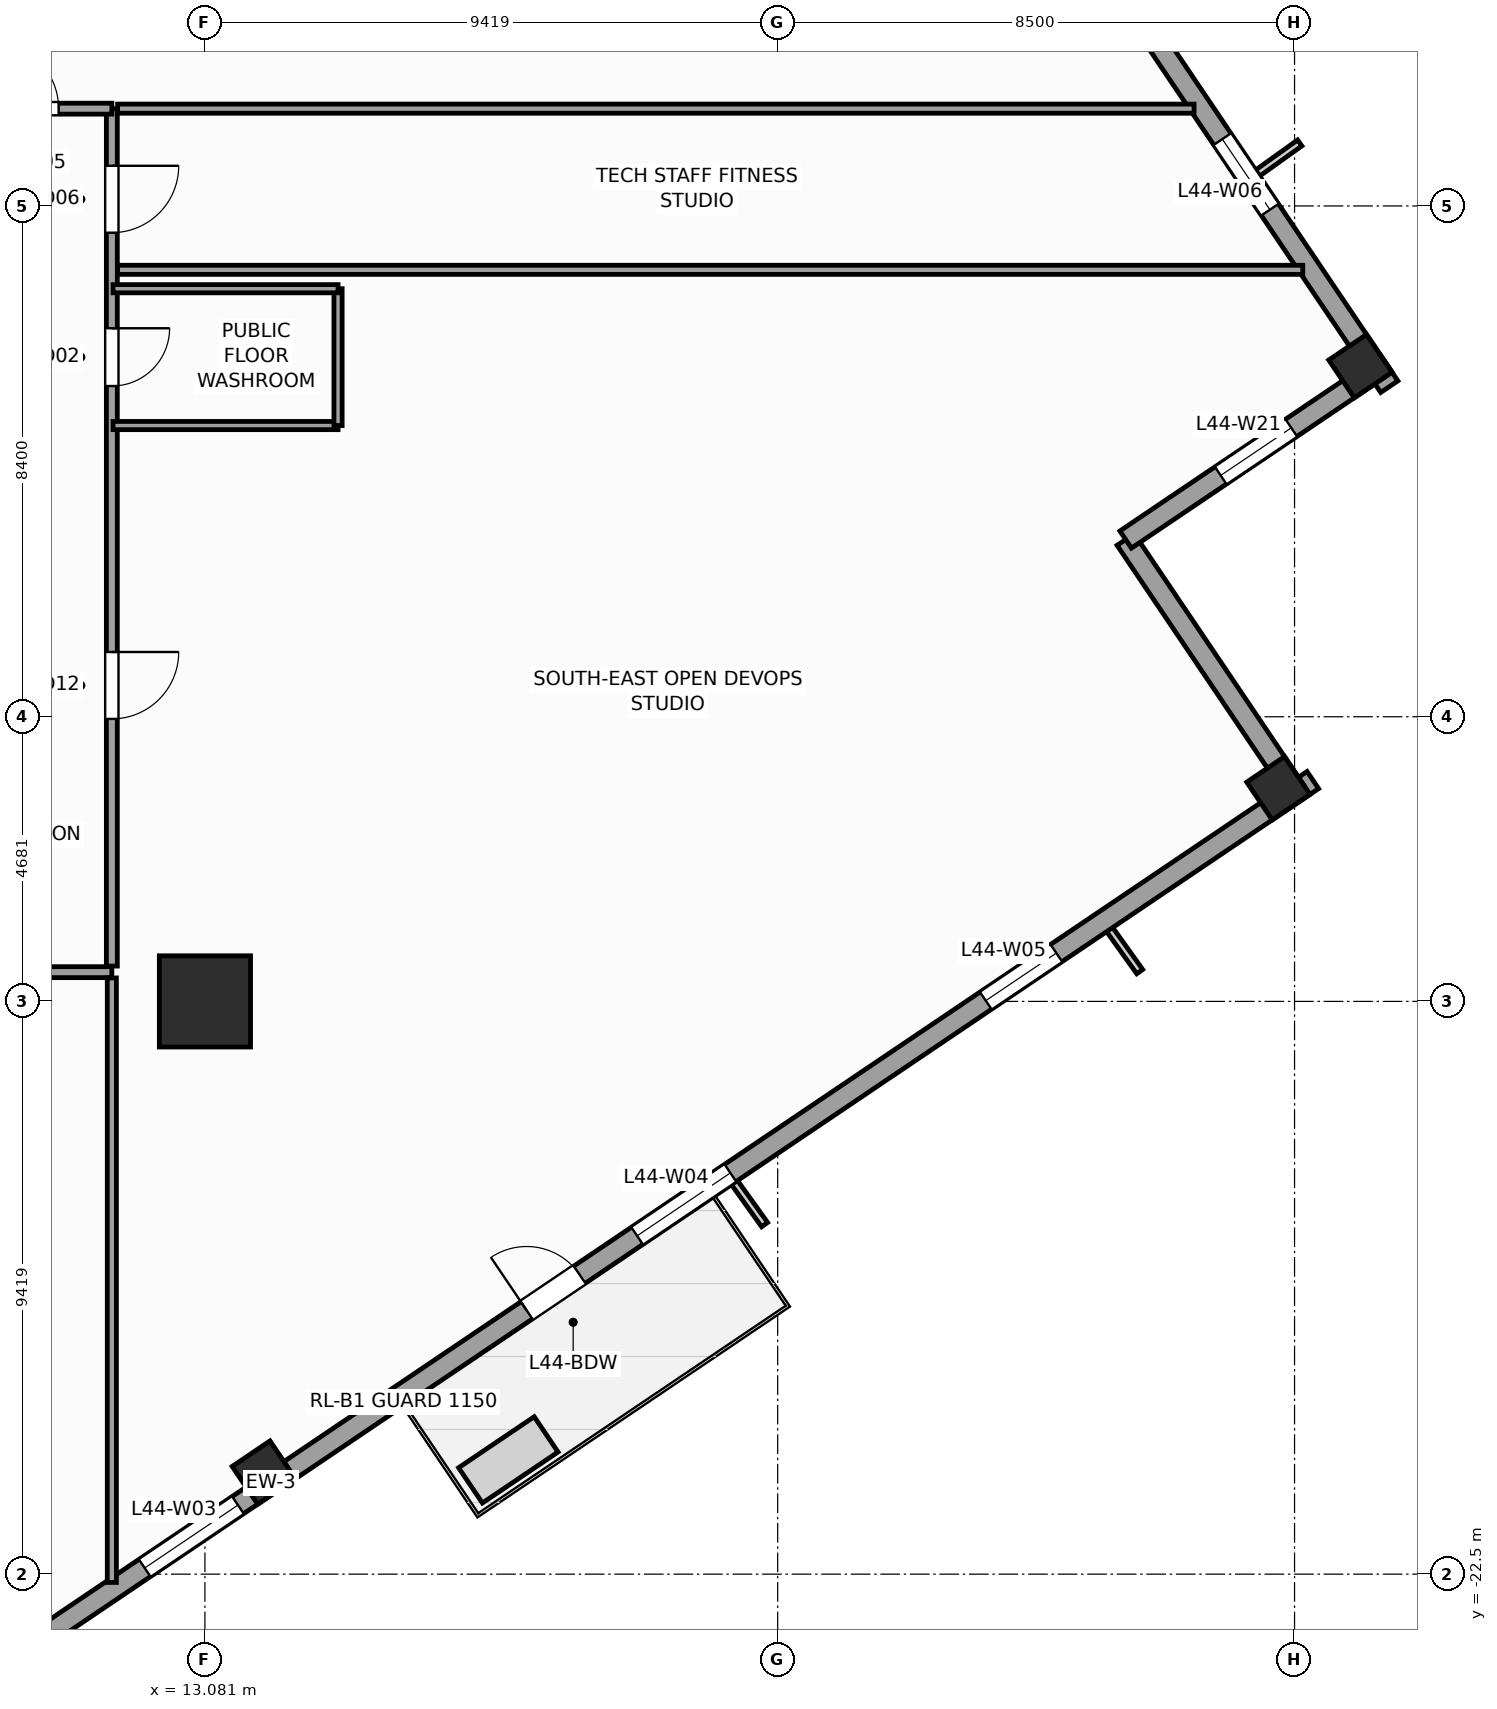
"""IFC4 building model, lengths in metres.
Left out: names, types, materials, properties, quantities, classifications, styles, units other than length and angle.
Written with IfcOpenShell. Run it as: python <this file> out.ifc"""

import sys

from ifc_helpers import new_model, si_unit, direction, frame, frame_2d, origin, origin_2d, place, context, subcontext, project, spatial, rectangle, extrude, source, transform, mapped, element, fill, save


model = new_model("IFC4")
c1 = context("Model", 3, precision=1e-05, world=origin(), true_north=direction((0.0, 1.0)))
c2 = subcontext(c1, "Body", "Model", "MODEL_VIEW")
j1 = project(units=[si_unit("LENGTHUNIT", "METRE"), si_unit("PLANEANGLEUNIT", "RADIAN")], contexts=[c1])
p1 = place(None, origin())
s1 = spatial("IfcSite", under=j1, at=p1, CompositionType="ELEMENT")
p2 = place(p1, origin())
s2 = spatial("IfcBuilding", under=s1, at=p2, CompositionType="ELEMENT")
p3 = place(p2, frame((0.0, 0.0, 184.4)))
s3 = spatial("IfcBuildingStorey", under=s2, at=p3, CompositionType="ELEMENT", Elevation=184.4)
m1 = source(origin(), c2, "Body", "SweptSolid", [
    extrude(rectangle(XDim=1.5, YDim=1.5, at=origin_2d()), origin(), (0.0, 0.0, 1.0), 4.0),
])
p4 = place(p3, frame((13.081, -13.081, 0.0), z_axis=(0.0, 0.0, 1.0), x_axis=(1.0, 0.0, 0.0)))
e1 = element("IfcColumn", 1, at=p4, inside=s3, PredefinedType="COLUMN", context=c2, shape_type="MappedRepresentation", body=[
    mapped(m1, transform((0.0, 0.0, 0.0), scale=1.0)),
])
m2 = source(origin(), c2, "Body", "SweptSolid", [
    extrude(rectangle(XDim=0.75, YDim=0.75, at=origin_2d()), origin(), (0.0, 0.0, 1.0), 4.0),
])
for number, where, z_axis, x_axis in (
    (2, (14.05, -20.83, 0.0), (0.0, 0.0, 1.0), (0.829, 0.559, 0.0)),
    (3, (30.734, -9.576, 0.0), (0.0, 0.0, 1.0), (0.829, 0.559, 0.0)),
    (4, (32.083, -2.635, 0.0), (0.0, 0.0, 1.0), (0.829, 0.559, 0.0)),
):
    element("IfcColumn", number, at=place(p3, frame(where, z_axis=z_axis, x_axis=x_axis)), inside=s3, PredefinedType="COLUMN", context=c2, shape_type="MappedRepresentation", body=[
        mapped(m2, transform((0.0, 0.0, 0.0), scale=1.0)),
    ])
p5 = place(p3, frame((-2.972, -32.558, 0.0), z_axis=(0.0, 0.0, 1.0), x_axis=(0.829036218961, 0.559194910251, 0.0)))
e5 = element("IfcWall", 5, at=p5, inside=s3, PredefinedType="STANDARD", context=c2, shape_type="SweptSolid", body=[
    extrude(rectangle(XDim=41.34, YDim=0.34, at=frame_2d((20.67, 0.0))), origin(), (0.0, 0.0, 1.0), 3.04),
])
p6 = place(p5, frame((25.745, 0.0, 0.0)))
e6 = element("IfcOpeningElement", 6, at=p6, cuts=e5, PredefinedType="OPENING", context=c2, shape_type="SweptSolid", body=[
    extrude(rectangle(XDim=1.05, YDim=2.25, at=frame_2d((0.525, 1.125))), frame((0.0, 0.18, 0.0), z_axis=(0.0, -1.0, 0.0), x_axis=(1.0, 0.0, 0.0)), (0.0, 0.0, 1.0), 0.36),
])
p7 = place(p5, frame((4.261, 0.0, 0.56)))
e7 = element("IfcOpeningElement", 7, at=p7, cuts=e5, PredefinedType="OPENING", context=c2, shape_type="SweptSolid", body=[
    extrude(rectangle(XDim=1.4, YDim=2.4, at=frame_2d((0.7, 1.2))), frame((0.0, 0.18, 0.0), z_axis=(0.0, -1.0, 0.0), x_axis=(1.0, 0.0, 0.0)), (0.0, 0.0, 1.0), 0.36),
])
p8 = place(p5, frame((11.064, 0.0, 0.61)))
e8 = element("IfcOpeningElement", 8, at=p8, cuts=e5, PredefinedType="OPENING", context=c2, shape_type="SweptSolid", body=[
    extrude(rectangle(XDim=1.85, YDim=2.35, at=frame_2d((0.925, 1.175))), frame((0.0, 0.18, 0.0), z_axis=(0.0, -1.0, 0.0), x_axis=(1.0, 0.0, 0.0)), (0.0, 0.0, 1.0), 0.36),
])
p9 = place(p5, frame((18.168, 0.0, 0.61)))
e9 = element("IfcOpeningElement", 9, at=p9, cuts=e5, PredefinedType="OPENING", context=c2, shape_type="SweptSolid", body=[
    extrude(rectangle(XDim=1.85, YDim=2.35, at=frame_2d((0.925, 1.175))), frame((0.0, 0.18, 0.0), z_axis=(0.0, -1.0, 0.0), x_axis=(1.0, 0.0, 0.0)), (0.0, 0.0, 1.0), 0.36),
])
p10 = place(p5, frame((27.936, 0.0, 0.61)))
e10 = element("IfcOpeningElement", 10, at=p10, cuts=e5, PredefinedType="OPENING", context=c2, shape_type="SweptSolid", body=[
    extrude(rectangle(XDim=1.85, YDim=2.35, at=frame_2d((0.925, 1.175))), frame((0.0, 0.18, 0.0), z_axis=(0.0, -1.0, 0.0), x_axis=(1.0, 0.0, 0.0)), (0.0, 0.0, 1.0), 0.36),
])
p11 = place(p5, frame((34.852, 0.0, 0.56)))
e11 = element("IfcOpeningElement", 11, at=p11, cuts=e5, PredefinedType="OPENING", context=c2, shape_type="SweptSolid", body=[
    extrude(rectangle(XDim=1.4, YDim=2.4, at=frame_2d((0.7, 1.2))), frame((0.0, 0.18, 0.0), z_axis=(0.0, -1.0, 0.0), x_axis=(1.0, 0.0, 0.0)), (0.0, 0.0, 1.0), 0.36),
])
p12 = place(p3, frame((31.019, -9.631, 0.0), z_axis=(0.0, 0.0, 1.0), x_axis=(-0.559210350234, 0.829025804298, 0.0)))
e12 = element("IfcWall", 12, at=p12, inside=s3, PredefinedType="STANDARD", context=c2, shape_type="SweptSolid", body=[
    extrude(rectangle(XDim=5.0, YDim=0.34, at=frame_2d((2.5, 0.0))), origin(), (0.0, 0.0, 1.0), 3.74),
])
p13 = place(p3, frame((28.223, -5.486, 0.0), z_axis=(0.0, 0.0, 1.0), x_axis=(0.82905227345, 0.559171107879, 0.0)))
e13 = element("IfcWall", 13, at=p13, inside=s3, PredefinedType="STANDARD", context=c2, shape_type="SweptSolid", body=[
    extrude(rectangle(XDim=5.17, YDim=0.34, at=frame_2d((2.585, 0.0))), origin(), (0.0, 0.0, 1.0), 3.04),
])
p14 = place(p13, frame((1.885, 0.0, 0.56)))
e14 = element("IfcOpeningElement", 14, at=p14, cuts=e13, PredefinedType="OPENING", context=c2, shape_type="SweptSolid", body=[
    extrude(rectangle(XDim=1.4, YDim=2.4, at=frame_2d((0.7, 1.2))), frame((0.0, 0.18, 0.0), z_axis=(0.0, -1.0, 0.0), x_axis=(1.0, 0.0, 0.0)), (0.0, 0.0, 1.0), 0.36),
])
p15 = place(p3, frame((32.558, -2.972, 0.0), z_axis=(0.0, 0.0, 1.0), x_axis=(-0.559194910251, 0.829036218961, 0.0)))
e15 = element("IfcWall", 15, at=p15, inside=s3, PredefinedType="STANDARD", context=c2, shape_type="SweptSolid", body=[
    extrude(rectangle(XDim=41.34, YDim=0.34, at=frame_2d((20.67, 0.0))), origin(), (0.0, 0.0, 1.0), 3.04),
])
p16 = place(p15, frame((3.511, 0.0, 0.56)))
e16 = element("IfcOpeningElement", 16, at=p16, cuts=e15, PredefinedType="OPENING", context=c2, shape_type="SweptSolid", body=[
    extrude(rectangle(XDim=1.4, YDim=2.4, at=frame_2d((0.7, 1.2))), frame((0.0, 0.18, 0.0), z_axis=(0.0, -1.0, 0.0), x_axis=(1.0, 0.0, 0.0)), (0.0, 0.0, 1.0), 0.36),
])
p17 = place(p15, frame((11.064, 0.0, 0.61)))
e17 = element("IfcOpeningElement", 17, at=p17, cuts=e15, PredefinedType="OPENING", context=c2, shape_type="SweptSolid", body=[
    extrude(rectangle(XDim=1.85, YDim=2.35, at=frame_2d((0.925, 1.175))), frame((0.0, 0.18, 0.0), z_axis=(0.0, -1.0, 0.0), x_axis=(1.0, 0.0, 0.0)), (0.0, 0.0, 1.0), 0.36),
])
p18 = place(p15, frame((18.168, 0.0, 0.61)))
e18 = element("IfcOpeningElement", 18, at=p18, cuts=e15, PredefinedType="OPENING", context=c2, shape_type="SweptSolid", body=[
    extrude(rectangle(XDim=1.85, YDim=2.35, at=frame_2d((0.925, 1.175))), frame((0.0, 0.18, 0.0), z_axis=(0.0, -1.0, 0.0), x_axis=(1.0, 0.0, 0.0)), (0.0, 0.0, 1.0), 0.36),
])
p19 = place(p15, frame((27.186, 0.0, 0.61)))
e19 = element("IfcOpeningElement", 19, at=p19, cuts=e15, PredefinedType="OPENING", context=c2, shape_type="SweptSolid", body=[
    extrude(rectangle(XDim=1.85, YDim=2.35, at=frame_2d((0.925, 1.175))), frame((0.0, 0.18, 0.0), z_axis=(0.0, -1.0, 0.0), x_axis=(1.0, 0.0, 0.0)), (0.0, 0.0, 1.0), 0.36),
])
p20 = place(p15, frame((34.852, 0.0, 0.56)))
e20 = element("IfcOpeningElement", 20, at=p20, cuts=e15, PredefinedType="OPENING", context=c2, shape_type="SweptSolid", body=[
    extrude(rectangle(XDim=1.4, YDim=2.4, at=frame_2d((0.7, 1.2))), frame((0.0, 0.18, 0.0), z_axis=(0.0, -1.0, 0.0), x_axis=(1.0, 0.0, 0.0)), (0.0, 0.0, 1.0), 0.36),
])
p21 = place(p3, frame((-10.45, -12.6, 0.0), z_axis=(0.0, 0.0, 1.0), x_axis=(1.0, 0.0, 0.0)))
e21 = element("IfcWall", 21, at=p21, inside=s3, PredefinedType="PARTITIONING", context=c2, shape_type="SweptSolid", body=[
    extrude(rectangle(XDim=22.0, YDim=0.18, at=frame_2d((11.0, 0.0))), origin(), (0.0, 0.0, 1.0), 3.74),
])
p22 = place(p21, frame((11.286, 0.0, 0.0)))
e22 = element("IfcOpeningElement", 22, at=p22, cuts=e21, PredefinedType="OPENING", context=c2, shape_type="SweptSolid", body=[
    extrude(rectangle(XDim=0.95, YDim=2.1, at=frame_2d((0.475, 1.05))), frame((0.0, 0.1, 0.0), z_axis=(0.0, -1.0, 0.0), x_axis=(1.0, 0.0, 0.0)), (0.0, 0.0, 1.0), 0.2),
])
p23 = place(p21, frame((4.839, 0.0, 0.0)))
e23 = element("IfcOpeningElement", 23, at=p23, cuts=e21, PredefinedType="OPENING", context=c2, shape_type="SweptSolid", body=[
    extrude(rectangle(XDim=1.1, YDim=2.2, at=frame_2d((0.55, 1.1))), frame((0.0, 0.1, 0.0), z_axis=(0.0, -1.0, 0.0), x_axis=(1.0, 0.0, 0.0)), (0.0, 0.0, 1.0), 0.2),
])
p24 = place(p21, frame((16.66, 0.0, 0.0)))
e24 = element("IfcOpeningElement", 24, at=p24, cuts=e21, PredefinedType="OPENING", context=c2, shape_type="SweptSolid", body=[
    extrude(rectangle(XDim=1.1, YDim=2.2, at=frame_2d((0.55, 1.1))), frame((0.0, 0.1, 0.0), z_axis=(0.0, -1.0, 0.0), x_axis=(1.0, 0.0, 0.0)), (0.0, 0.0, 1.0), 0.2),
])
p25 = place(p3, frame((11.55, -12.5, 0.0), z_axis=(0.0, 0.0, 1.0), x_axis=(0.0, 1.0, 0.0)))
e25 = element("IfcWall", 25, at=p25, inside=s3, PredefinedType="PARTITIONING", context=c2, shape_type="SweptSolid", body=[
    extrude(rectangle(XDim=14.1, YDim=0.18, at=frame_2d((7.05, 0.0))), origin(), (0.0, 0.0, 1.0), 3.74),
])
p26 = place(p25, frame((9.539, 0.0, 0.0)))
e26 = element("IfcOpeningElement", 26, at=p26, cuts=e25, PredefinedType="OPENING", context=c2, shape_type="SweptSolid", body=[
    extrude(rectangle(XDim=0.95, YDim=2.1, at=frame_2d((0.475, 1.05))), frame((0.0, 0.1, 0.0), z_axis=(0.0, -1.0, 0.0), x_axis=(1.0, 0.0, 0.0)), (0.0, 0.0, 1.0), 0.2),
])
p27 = place(p25, frame((12.061, 0.0, 0.0)))
e27 = element("IfcOpeningElement", 27, at=p27, cuts=e25, PredefinedType="OPENING", context=c2, shape_type="SweptSolid", body=[
    extrude(rectangle(XDim=1.1, YDim=2.2, at=frame_2d((0.55, 1.1))), frame((0.0, 0.1, 0.0), z_axis=(0.0, -1.0, 0.0), x_axis=(1.0, 0.0, 0.0)), (0.0, 0.0, 1.0), 0.2),
])
p28 = place(p25, frame((4.065, 0.0, 0.0)))
e28 = element("IfcOpeningElement", 28, at=p28, cuts=e25, PredefinedType="OPENING", context=c2, shape_type="SweptSolid", body=[
    extrude(rectangle(XDim=1.1, YDim=2.2, at=frame_2d((0.55, 1.1))), frame((0.0, 0.1, 0.0), z_axis=(0.0, -1.0, 0.0), x_axis=(1.0, 0.0, 0.0)), (0.0, 0.0, 1.0), 0.2),
])
p29 = place(p3, frame((8.7, 1.6, 0.0), z_axis=(0.0, 0.0, 1.0), x_axis=(1.0, 0.0, 0.0)))
e29 = element("IfcWall", 29, at=p29, inside=s3, PredefinedType="PARTITIONING", context=c2, shape_type="SweptSolid", body=[
    extrude(rectangle(XDim=2.85, YDim=0.18, at=frame_2d((1.425, 0.0))), origin(), (0.0, 0.0, 1.0), 3.74),
])
p30 = place(p29, frame((0.875, 0.0, 0.0)))
e30 = element("IfcOpeningElement", 30, at=p30, cuts=e29, PredefinedType="OPENING", context=c2, shape_type="SweptSolid", body=[
    extrude(rectangle(XDim=1.1, YDim=2.2, at=frame_2d((0.55, 1.1))), frame((0.0, 0.1, 0.0), z_axis=(0.0, -1.0, 0.0), x_axis=(1.0, 0.0, 0.0)), (0.0, 0.0, 1.0), 0.2),
])
p31 = place(p3, frame((11.645, -1.05, 0.0), z_axis=(0.0, 0.0, 1.0), x_axis=(1.0, 0.0, 0.0)))
e31 = element("IfcWall", 31, at=p31, inside=s3, PredefinedType="PARTITIONING", context=c2, shape_type="SweptSolid", body=[
    extrude(rectangle(XDim=19.49, YDim=0.15, at=frame_2d((9.745, 0.0))), origin(), (0.0, 0.0, 1.0), 3.74),
])
p32 = place(p3, frame((11.645, 1.6, 0.0), z_axis=(0.0, 0.0, 1.0), x_axis=(1.0, 0.0, 0.0)))
e32 = element("IfcWall", 32, at=p32, inside=s3, PredefinedType="PARTITIONING", context=c2, shape_type="SweptSolid", body=[
    extrude(rectangle(XDim=17.703, YDim=0.15, at=frame_2d((8.851, 0.0))), origin(), (0.0, 0.0, 1.0), 3.74),
])
p33 = place(p3, frame((11.55, -22.636, 0.0), z_axis=(0.0, 0.0, 1.0), x_axis=(0.0, 1.0, 0.0)))
e33 = element("IfcWall", 33, at=p33, inside=s3, PredefinedType="PARTITIONING", context=c2, shape_type="SweptSolid", body=[
    extrude(rectangle(XDim=9.941, YDim=0.15, at=frame_2d((4.971, 0.0))), origin(), (0.0, 0.0, 1.0), 3.74),
])
p34 = place(p3, frame((11.57, -3.611, 0.0), z_axis=(0.0, 0.0, 1.0), x_axis=(1.0, 0.0, 0.0)))
e34 = element("IfcWall", 34, at=p34, inside=s3, PredefinedType="PARTITIONING", context=c2, shape_type="SweptSolid", body=[
    extrude(rectangle(XDim=3.7, YDim=0.135, at=frame_2d((1.85, 0.0))), origin(), (0.0, 0.0, 1.0), 3.74),
])
p35 = place(p3, frame((15.27, -3.611, 0.0), z_axis=(0.0, 0.0, 1.0), x_axis=(0.0, 1.0, 0.0)))
e35 = element("IfcWall", 35, at=p35, inside=s3, PredefinedType="PARTITIONING", context=c2, shape_type="SweptSolid", body=[
    extrude(rectangle(XDim=2.25, YDim=0.135, at=frame_2d((1.125, 0.0))), origin(), (0.0, 0.0, 1.0), 3.24),
])
p36 = place(p3, frame((11.57, -1.361, 0.0), z_axis=(0.0, 0.0, 1.0), x_axis=(1.0, 0.0, 0.0)))
e36 = element("IfcWall", 36, at=p36, inside=s3, PredefinedType="PARTITIONING", context=c2, shape_type="SweptSolid", body=[
    extrude(rectangle(XDim=3.7, YDim=0.135, at=frame_2d((1.85, 0.0))), origin(), (0.0, 0.0, 1.0), 3.74),
])
m3 = source(origin(), c2, "Body", "SweptSolid", [
    extrude(rectangle(XDim=1.05, YDim=2.25, at=frame_2d((0.525, 1.125))), frame((0.0, 0.025, 0.0), z_axis=(0.0, -1.0, 0.0), x_axis=(1.0, 0.0, 0.0)), (0.0, 0.0, 1.0), 0.05),
])
p37 = place(p6, origin())
e37 = element("IfcDoor", 37, at=p37, inside=s3, OperationType="SINGLE_SWING_LEFT", PredefinedType="DOOR", context=c2, shape_type="MappedRepresentation", body=[
    mapped(m3, transform((0.0, 0.0, 0.0), scale=1.0)),
])
fill(e6, e37)
m4 = source(origin(), c2, "Body", "SweptSolid", [
    extrude(rectangle(XDim=1.85, YDim=2.35, at=frame_2d((0.925, 1.175))), frame((0.0, 0.03, 0.0), z_axis=(0.0, -1.0, 0.0), x_axis=(1.0, 0.0, 0.0)), (0.0, 0.0, 1.0), 0.06),
])
p38 = place(p9, origin())
e38 = element("IfcWindow", 38, at=p38, inside=s3, PartitioningType="SINGLE_PANEL", PredefinedType="WINDOW", context=c2, shape_type="MappedRepresentation", body=[
    mapped(m4, transform((0.0, 0.0, 0.0), scale=1.0)),
])
fill(e9, e38)
p39 = place(p10, origin())
e39 = element("IfcWindow", 39, at=p39, inside=s3, PartitioningType="SINGLE_PANEL", PredefinedType="WINDOW", context=c2, shape_type="MappedRepresentation", body=[
    mapped(m4, transform((0.0, 0.0, 0.0), scale=1.0)),
])
fill(e10, e39)
m5 = source(origin(), c2, "Body", "SweptSolid", [
    extrude(rectangle(XDim=1.4, YDim=2.4, at=frame_2d((0.7, 1.2))), frame((0.0, 0.03, 0.0), z_axis=(0.0, -1.0, 0.0), x_axis=(1.0, 0.0, 0.0)), (0.0, 0.0, 1.0), 0.06),
])
p40 = place(p11, origin())
e40 = element("IfcWindow", 40, at=p40, inside=s3, PartitioningType="SINGLE_PANEL", PredefinedType="WINDOW", context=c2, shape_type="MappedRepresentation", body=[
    mapped(m5, transform((0.0, 0.0, 0.0), scale=1.0)),
])
fill(e11, e40)
p41 = place(p16, origin())
e41 = element("IfcWindow", 41, at=p41, inside=s3, PartitioningType="SINGLE_PANEL", PredefinedType="WINDOW", context=c2, shape_type="MappedRepresentation", body=[
    mapped(m5, transform((0.0, 0.0, 0.0), scale=1.0)),
])
fill(e16, e41)
p42 = place(p14, origin())
e42 = element("IfcWindow", 42, at=p42, inside=s3, PartitioningType="SINGLE_PANEL", PredefinedType="WINDOW", context=c2, shape_type="MappedRepresentation", body=[
    mapped(m5, transform((0.0, 0.0, 0.0), scale=1.0)),
])
fill(e14, e42)
m6 = source(origin(), c2, "Body", "SweptSolid", [
    extrude(rectangle(XDim=0.95, YDim=2.1, at=frame_2d((0.475, 1.05))), frame((0.0, 0.025, 0.0), z_axis=(0.0, -1.0, 0.0), x_axis=(1.0, 0.0, 0.0)), (0.0, 0.0, 1.0), 0.05),
])
p43 = place(p26, frame((0.95, 0.0, 0.0), z_axis=(0.0, 0.0, 1.0), x_axis=(-1.0, 0.0, 0.0)))
e43 = element("IfcDoor", 43, at=p43, inside=s3, OperationType="SINGLE_SWING_RIGHT", PredefinedType="DOOR", context=c2, shape_type="MappedRepresentation", body=[
    mapped(m6, transform((0.0, 0.0, 0.0), scale=1.0)),
])
fill(e26, e43)
m7 = source(origin(), c2, "Body", "SweptSolid", [
    extrude(rectangle(XDim=1.1, YDim=2.2, at=frame_2d((0.55, 1.1))), frame((0.0, 0.025, 0.0), z_axis=(0.0, -1.0, 0.0), x_axis=(1.0, 0.0, 0.0)), (0.0, 0.0, 1.0), 0.05),
])
p44 = place(p30, origin())
e44 = element("IfcDoor", 44, at=p44, inside=s3, OperationType="SINGLE_SWING_LEFT", PredefinedType="DOOR", context=c2, shape_type="MappedRepresentation", body=[
    mapped(m7, transform((0.0, 0.0, 0.0), scale=1.0)),
])
fill(e30, e44)
p45 = place(p27, frame((1.1, 0.0, 0.0), z_axis=(0.0, 0.0, 1.0), x_axis=(-1.0, 0.0, 0.0)))
e45 = element("IfcDoor", 45, at=p45, inside=s3, OperationType="SINGLE_SWING_RIGHT", PredefinedType="DOOR", context=c2, shape_type="MappedRepresentation", body=[
    mapped(m7, transform((0.0, 0.0, 0.0), scale=1.0)),
])
fill(e27, e45)
p46 = place(p28, frame((1.1, 0.0, 0.0), z_axis=(0.0, 0.0, 1.0), x_axis=(-1.0, 0.0, 0.0)))
e46 = element("IfcDoor", 46, at=p46, inside=s3, OperationType="SINGLE_SWING_RIGHT", PredefinedType="DOOR", context=c2, shape_type="MappedRepresentation", body=[
    mapped(m7, transform((0.0, 0.0, 0.0), scale=1.0)),
])
fill(e28, e46)
save(model, sys.argv[1])
